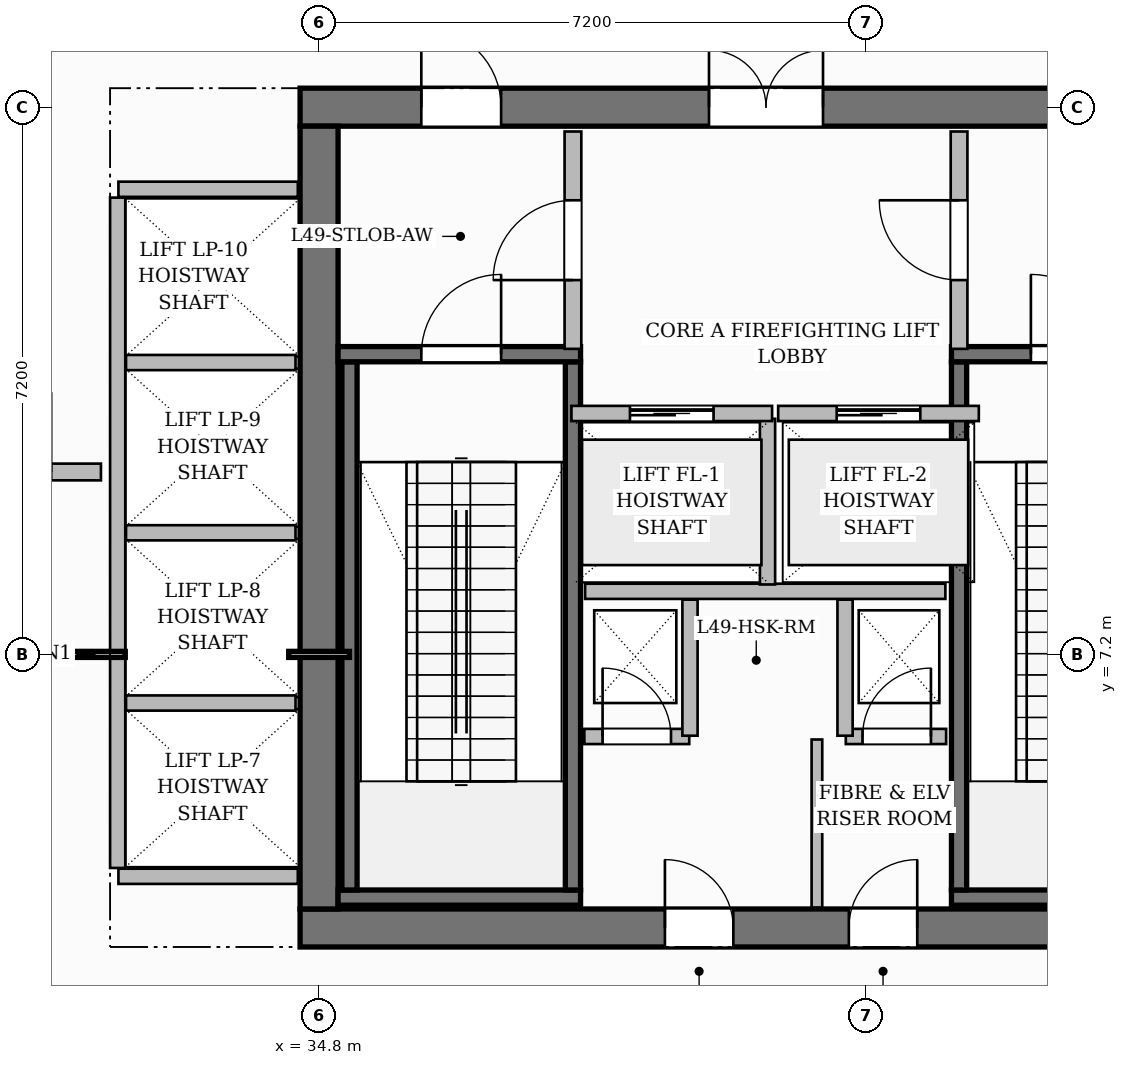
"""IFC4 building model, lengths in metres.
Left out: names, types, materials, properties, quantities, classifications, styles, units other than length and angle.
Written with IfcOpenShell. Run it as: python <this file> out.ifc"""

import sys

from ifc_helpers import new_model, si_unit, direction, frame, frame_2d, origin, place, context, subcontext, project, spatial, rectangle, extrude, source, transform, mapped, element, fill, save


model = new_model("IFC4")
c1 = context("Model", 3, precision=1e-05, world=origin(), true_north=direction((0.0, 1.0)))
c2 = subcontext(c1, "Body", "Model", "MODEL_VIEW")
j1 = project(units=[si_unit("LENGTHUNIT", "METRE"), si_unit("PLANEANGLEUNIT", "RADIAN")], contexts=[c1])
p1 = place(None, origin())
s1 = spatial("IfcSite", under=j1, at=p1, CompositionType="ELEMENT")
p2 = place(p1, origin())
s2 = spatial("IfcBuilding", under=s1, at=p2, CompositionType="ELEMENT")
p3 = place(p2, frame((0.0, 0.0, 196.5)))
s3 = spatial("IfcBuildingStorey", under=s2, at=p3, CompositionType="ELEMENT", Elevation=196.5)
p4 = place(p3, frame((34.55, 3.6, 0.0), z_axis=(0.0, 0.0, 1.0), x_axis=(1.0, 0.0, 0.0)))
e1 = element("IfcWall", 1, at=p4, inside=s3, PredefinedType="SHEAR", context=c2, shape_type="SweptSolid", body=[
    extrude(rectangle(XDim=15.5, YDim=0.5, at=frame_2d((7.75, 0.0))), origin(), (0.0, 0.0, 1.0), 5.4),
])
p5 = place(p4, frame((4.8, 0.0, 0.0)))
e2 = element("IfcOpeningElement", 2, at=p5, cuts=e1, PredefinedType="OPENING", context=c2, shape_type="SweptSolid", body=[
    extrude(rectangle(XDim=0.9, YDim=2.1, at=frame_2d((0.45, 1.05))), frame((0.0, 0.26, 0.0), z_axis=(0.0, -1.0, 0.0), x_axis=(1.0, 0.0, 0.0)), (0.0, 0.0, 1.0), 0.52),
])
p6 = place(p4, frame((7.22, 0.0, 0.0)))
e3 = element("IfcOpeningElement", 3, at=p6, cuts=e1, PredefinedType="OPENING", context=c2, shape_type="SweptSolid", body=[
    extrude(rectangle(XDim=0.9, YDim=2.1, at=frame_2d((0.45, 1.05))), frame((0.0, 0.26, 0.0), z_axis=(0.0, -1.0, 0.0), x_axis=(1.0, 0.0, 0.0)), (0.0, 0.0, 1.0), 0.52),
])
p7 = place(p3, frame((34.55, 14.4, 0.0), z_axis=(0.0, 0.0, 1.0), x_axis=(1.0, 0.0, 0.0)))
e4 = element("IfcWall", 4, at=p7, inside=s3, PredefinedType="SHEAR", context=c2, shape_type="SweptSolid", body=[
    extrude(rectangle(XDim=15.5, YDim=0.5, at=frame_2d((7.75, 0.0))), origin(), (0.0, 0.0, 1.0), 5.4),
])
p8 = place(p7, frame((5.38, 0.0, 0.0)))
e5 = element("IfcOpeningElement", 5, at=p8, cuts=e4, PredefinedType="OPENING", context=c2, shape_type="SweptSolid", body=[
    extrude(rectangle(XDim=1.5, YDim=2.2, at=frame_2d((0.75, 1.1))), frame((0.0, 0.26, 0.0), z_axis=(0.0, -1.0, 0.0), x_axis=(1.0, 0.0, 0.0)), (0.0, 0.0, 1.0), 0.52),
])
p9 = place(p7, frame((1.595, 0.0, 0.0)))
e6 = element("IfcOpeningElement", 6, at=p9, cuts=e4, PredefinedType="OPENING", context=c2, shape_type="SweptSolid", body=[
    extrude(rectangle(XDim=1.05, YDim=2.15, at=frame_2d((0.525, 1.075))), frame((0.0, 0.26, 0.0), z_axis=(0.0, -1.0, 0.0), x_axis=(1.0, 0.0, 0.0)), (0.0, 0.0, 1.0), 0.52),
])
p10 = place(p7, frame((11.225, 0.0, 0.0)))
e7 = element("IfcOpeningElement", 7, at=p10, cuts=e4, PredefinedType="OPENING", context=c2, shape_type="SweptSolid", body=[
    extrude(rectangle(XDim=1.05, YDim=2.15, at=frame_2d((0.525, 1.075))), frame((0.0, 0.26, 0.0), z_axis=(0.0, -1.0, 0.0), x_axis=(1.0, 0.0, 0.0)), (0.0, 0.0, 1.0), 0.52),
])
p11 = place(p3, frame((34.8, 3.85, 0.0), z_axis=(0.0, 0.0, 1.0), x_axis=(0.0, 1.0, 0.0)))
e8 = element("IfcWall", 8, at=p11, inside=s3, PredefinedType="SHEAR", context=c2, shape_type="SweptSolid", body=[
    extrude(rectangle(XDim=10.3, YDim=0.5, at=frame_2d((5.15, 0.0))), origin(), (0.0, 0.0, 1.0), 5.4),
])
p12 = place(p3, frame((35.05, 4.0, 0.0), z_axis=(0.0, 0.0, 1.0), x_axis=(1.0, 0.0, 0.0)))
e9 = element("IfcWall", 9, at=p12, inside=s3, PredefinedType="SHEAR", context=c2, shape_type="SweptSolid", body=[
    extrude(rectangle(XDim=3.19, YDim=0.2, at=frame_2d((1.595, 0.0))), origin(), (0.0, 0.0, 1.0), 5.4),
])
for number, where, z_axis, x_axis in (
    (10, (35.2, 4.1, 0.0), (0.0, 0.0, 1.0), (0.0, 1.0, 0.0)),
    (11, (38.14, 4.1, 0.0), (0.0, 0.0, 1.0), (0.0, 1.0, 0.0)),
):
    element("IfcWall", number, at=place(p3, frame(where, z_axis=z_axis, x_axis=x_axis)), inside=s3, PredefinedType="SHEAR", context=c2, shape_type="SweptSolid", body=[
        extrude(rectangle(XDim=6.95, YDim=0.2, at=frame_2d((3.475, 0.0))), origin(), (0.0, 0.0, 1.0), 5.4),
    ])
p13 = place(p3, frame((35.05, 11.15, 0.0), z_axis=(0.0, 0.0, 1.0), x_axis=(1.0, 0.0, 0.0)))
e12 = element("IfcWall", 12, at=p13, inside=s3, PredefinedType="SHEAR", context=c2, shape_type="SweptSolid", body=[
    extrude(rectangle(XDim=3.19, YDim=0.2, at=frame_2d((1.595, 0.0))), origin(), (0.0, 0.0, 1.0), 5.4),
])
p14 = place(p13, frame((1.095, 0.0, 0.0)))
e13 = element("IfcOpeningElement", 13, at=p14, cuts=e12, PredefinedType="OPENING", context=c2, shape_type="SweptSolid", body=[
    extrude(rectangle(XDim=1.05, YDim=2.2, at=frame_2d((0.525, 1.1))), frame((0.0, 0.11, 0.0), z_axis=(0.0, -1.0, 0.0), x_axis=(1.0, 0.0, 0.0)), (0.0, 0.0, 1.0), 0.22),
])
p15 = place(p3, frame((43.12, 4.0, 0.0), z_axis=(0.0, 0.0, 1.0), x_axis=(1.0, 0.0, 0.0)))
e14 = element("IfcWall", 14, at=p15, inside=s3, PredefinedType="SHEAR", context=c2, shape_type="SweptSolid", body=[
    extrude(rectangle(XDim=6.43, YDim=0.2, at=frame_2d((3.215, 0.0))), origin(), (0.0, 0.0, 1.0), 5.4),
])
p16 = place(p3, frame((43.22, 4.1, 0.0), z_axis=(0.0, 0.0, 1.0), x_axis=(0.0, 1.0, 0.0)))
e15 = element("IfcWall", 15, at=p16, inside=s3, PredefinedType="SHEAR", context=c2, shape_type="SweptSolid", body=[
    extrude(rectangle(XDim=6.95, YDim=0.2, at=frame_2d((3.475, 0.0))), origin(), (0.0, 0.0, 1.0), 5.4),
])
p17 = place(p3, frame((43.12, 11.15, 0.0), z_axis=(0.0, 0.0, 1.0), x_axis=(1.0, 0.0, 0.0)))
e16 = element("IfcWall", 16, at=p17, inside=s3, PredefinedType="SHEAR", context=c2, shape_type="SweptSolid", body=[
    extrude(rectangle(XDim=6.43, YDim=0.2, at=frame_2d((3.215, 0.0))), origin(), (0.0, 0.0, 1.0), 5.4),
])
p18 = place(p17, frame((1.045, 0.0, 0.0)))
e17 = element("IfcOpeningElement", 17, at=p18, cuts=e16, PredefinedType="OPENING", context=c2, shape_type="SweptSolid", body=[
    extrude(rectangle(XDim=1.05, YDim=2.2, at=frame_2d((0.525, 1.1))), frame((0.0, 0.11, 0.0), z_axis=(0.0, -1.0, 0.0), x_axis=(1.0, 0.0, 0.0)), (0.0, 0.0, 1.0), 0.22),
])
p19 = place(p17, frame((4.125, 0.0, 0.0)))
e18 = element("IfcOpeningElement", 18, at=p19, cuts=e16, PredefinedType="OPENING", context=c2, shape_type="SweptSolid", body=[
    extrude(rectangle(XDim=1.05, YDim=2.2, at=frame_2d((0.525, 1.1))), frame((0.0, 0.11, 0.0), z_axis=(0.0, -1.0, 0.0), x_axis=(1.0, 0.0, 0.0)), (0.0, 0.0, 1.0), 0.22),
])
p20 = place(p3, frame((38.3, 8.03, 0.0), z_axis=(0.0, 0.0, 1.0), x_axis=(1.0, 0.0, 0.0)))
e19 = element("IfcWall", 19, at=p20, inside=s3, PredefinedType="PARTITIONING", context=c2, shape_type="SweptSolid", body=[
    extrude(rectangle(XDim=4.74, YDim=0.2, at=frame_2d((2.37, 0.0))), origin(), (0.0, 0.0, 1.0), 5.15),
])
p21 = place(p3, frame((40.7, 8.12, 0.0), z_axis=(0.0, 0.0, 1.0), x_axis=(0.0, 1.0, 0.0)))
e20 = element("IfcWall", 20, at=p21, inside=s3, PredefinedType="PARTITIONING", context=c2, shape_type="SweptSolid", body=[
    extrude(rectangle(XDim=2.18, YDim=0.2, at=frame_2d((1.09, 0.0))), origin(), (0.0, 0.0, 1.0), 5.15),
])
p22 = place(p3, frame((38.14, 11.22, 0.0), z_axis=(0.0, 0.0, 1.0), x_axis=(0.0, 1.0, 0.0)))
e21 = element("IfcWall", 21, at=p22, inside=s3, PredefinedType="PARTITIONING", context=c2, shape_type="SweptSolid", body=[
    extrude(rectangle(XDim=2.86, YDim=0.22, at=frame_2d((1.43, 0.0))), origin(), (0.0, 0.0, 1.0), 5.15),
])
p23 = place(p22, frame((0.905, 0.0, 0.0)))
e22 = element("IfcOpeningElement", 22, at=p23, cuts=e21, PredefinedType="OPENING", context=c2, shape_type="SweptSolid", body=[
    extrude(rectangle(XDim=1.05, YDim=2.15, at=frame_2d((0.525, 1.075))), frame((0.0, 0.12, 0.0), z_axis=(0.0, -1.0, 0.0), x_axis=(1.0, 0.0, 0.0)), (0.0, 0.0, 1.0), 0.24),
])
p24 = place(p3, frame((43.22, 11.22, 0.0), z_axis=(0.0, 0.0, 1.0), x_axis=(0.0, 1.0, 0.0)))
e23 = element("IfcWall", 23, at=p24, inside=s3, PredefinedType="PARTITIONING", context=c2, shape_type="SweptSolid", body=[
    extrude(rectangle(XDim=2.86, YDim=0.22, at=frame_2d((1.43, 0.0))), origin(), (0.0, 0.0, 1.0), 5.15),
])
p25 = place(p24, frame((0.905, 0.0, 0.0)))
e24 = element("IfcOpeningElement", 24, at=p25, cuts=e23, PredefinedType="OPENING", context=c2, shape_type="SweptSolid", body=[
    extrude(rectangle(XDim=1.05, YDim=2.15, at=frame_2d((0.525, 1.075))), frame((0.0, 0.12, 0.0), z_axis=(0.0, -1.0, 0.0), x_axis=(1.0, 0.0, 0.0)), (0.0, 0.0, 1.0), 0.24),
])
p26 = place(p3, frame((38.29, 6.12, 0.0), z_axis=(0.0, 0.0, 1.0), x_axis=(1.0, 0.0, 0.0)))
e25 = element("IfcWall", 25, at=p26, inside=s3, PredefinedType="PARTITIONING", context=c2, shape_type="SweptSolid", body=[
    extrude(rectangle(XDim=1.38, YDim=0.2, at=frame_2d((0.69, 0.0))), origin(), (0.0, 0.0, 1.0), 5.15),
])
p27 = place(p26, frame((0.24, 0.0, 0.0)))
e26 = element("IfcOpeningElement", 26, at=p27, cuts=e25, PredefinedType="OPENING", context=c2, shape_type="SweptSolid", body=[
    extrude(rectangle(XDim=0.9, YDim=2.1, at=frame_2d((0.45, 1.05))), frame((0.0, 0.11, 0.0), z_axis=(0.0, -1.0, 0.0), x_axis=(1.0, 0.0, 0.0)), (0.0, 0.0, 1.0), 0.22),
])
p28 = place(p3, frame((39.68, 6.13, 0.0), z_axis=(0.0, 0.0, 1.0), x_axis=(0.0, 1.0, 0.0)))
e27 = element("IfcWall", 27, at=p28, inside=s3, PredefinedType="PARTITIONING", context=c2, shape_type="SweptSolid", body=[
    extrude(rectangle(XDim=1.79, YDim=0.2, at=frame_2d((0.895, 0.0))), origin(), (0.0, 0.0, 1.0), 5.15),
])
p29 = place(p3, frame((41.73, 6.12, 0.0), z_axis=(0.0, 0.0, 1.0), x_axis=(1.0, 0.0, 0.0)))
e28 = element("IfcWall", 28, at=p29, inside=s3, PredefinedType="PARTITIONING", context=c2, shape_type="SweptSolid", body=[
    extrude(rectangle(XDim=1.32, YDim=0.2, at=frame_2d((0.66, 0.0))), origin(), (0.0, 0.0, 1.0), 5.15),
])
p30 = place(p29, frame((0.22, 0.0, 0.0)))
e29 = element("IfcOpeningElement", 29, at=p30, cuts=e28, PredefinedType="OPENING", context=c2, shape_type="SweptSolid", body=[
    extrude(rectangle(XDim=0.9, YDim=2.1, at=frame_2d((0.45, 1.05))), frame((0.0, 0.11, 0.0), z_axis=(0.0, -1.0, 0.0), x_axis=(1.0, 0.0, 0.0)), (0.0, 0.0, 1.0), 0.22),
])
p31 = place(p3, frame((41.72, 6.13, 0.0), z_axis=(0.0, 0.0, 1.0), x_axis=(0.0, 1.0, 0.0)))
e30 = element("IfcWall", 30, at=p31, inside=s3, PredefinedType="PARTITIONING", context=c2, shape_type="SweptSolid", body=[
    extrude(rectangle(XDim=1.79, YDim=0.2, at=frame_2d((0.895, 0.0))), origin(), (0.0, 0.0, 1.0), 5.15),
])
p32 = place(p3, frame((41.35, 3.87, 0.0), z_axis=(0.0, 0.0, 1.0), x_axis=(0.0, 1.0, 0.0)))
e31 = element("IfcWall", 31, at=p32, inside=s3, PredefinedType="PARTITIONING", context=c2, shape_type="SweptSolid", body=[
    extrude(rectangle(XDim=2.21, YDim=0.14, at=frame_2d((1.105, 0.0))), origin(), (0.0, 0.0, 1.0), 5.15),
])
for number, where, z_axis, x_axis in (
    (32, (32.16, 4.28, 0.0), (0.0, 0.0, 1.0), (1.0, 0.0, 0.0)),
    (33, (32.16, 13.32, 0.0), (0.0, 0.0, 1.0), (1.0, 0.0, 0.0)),
):
    element("IfcWall", number, at=place(p3, frame(where, z_axis=z_axis, x_axis=x_axis)), inside=s3, PredefinedType="PARTITIONING", context=c2, shape_type="SweptSolid", body=[
        extrude(rectangle(XDim=2.36, YDim=0.2, at=frame_2d((1.18, 0.0))), origin(), (0.0, 0.0, 1.0), 5.15),
    ])
p33 = place(p3, frame((32.15, 4.39, 0.0), z_axis=(0.0, 0.0, 1.0), x_axis=(0.0, 1.0, 0.0)))
e34 = element("IfcWall", 34, at=p33, inside=s3, PredefinedType="PARTITIONING", context=c2, shape_type="SweptSolid", body=[
    extrude(rectangle(XDim=8.82, YDim=0.2, at=frame_2d((4.41, 0.0))), origin(), (0.0, 0.0, 1.0), 5.15),
])
for number, where, z_axis, x_axis in (
    (35, (32.26, 6.56, 0.0), (0.0, 0.0, 1.0), (1.0, 0.0, 0.0)),
    (36, (32.26, 8.8, 0.0), (0.0, 0.0, 1.0), (1.0, 0.0, 0.0)),
    (37, (32.26, 11.04, 0.0), (0.0, 0.0, 1.0), (1.0, 0.0, 0.0)),
):
    element("IfcWall", number, at=place(p3, frame(where, z_axis=z_axis, x_axis=x_axis)), inside=s3, PredefinedType="PARTITIONING", context=c2, shape_type="SweptSolid", body=[
        extrude(rectangle(XDim=2.23, YDim=0.2, at=frame_2d((1.115, 0.0))), origin(), (0.0, 0.0, 1.0), 5.15),
    ])
p34 = place(p3, frame((14.558, 9.6, 0.0), z_axis=(0.0, 0.0, 1.0), x_axis=(1.0, 0.0, 0.0)))
e38 = element("IfcWall", 38, at=p34, inside=s3, PredefinedType="PARTITIONING", context=c2, shape_type="SweptSolid", body=[
    extrude(rectangle(XDim=17.372, YDim=0.22, at=frame_2d((8.686, 0.0))), origin(), (0.0, 0.0, 1.0), 5.15),
])
p35 = place(p34, frame((15.667, 0.0, 0.0)))
e39 = element("IfcOpeningElement", 39, at=p35, cuts=e38, PredefinedType="OPENING", context=c2, shape_type="SweptSolid", body=[
    extrude(rectangle(XDim=1.05, YDim=2.15, at=frame_2d((0.525, 1.075))), frame((0.0, 0.12, 0.0), z_axis=(0.0, -1.0, 0.0), x_axis=(1.0, 0.0, 0.0)), (0.0, 0.0, 1.0), 0.24),
])
p36 = place(p34, frame((8.192, 0.0, 0.0)))
e40 = element("IfcOpeningElement", 40, at=p36, cuts=e38, PredefinedType="OPENING", context=c2, shape_type="SweptSolid", body=[
    extrude(rectangle(XDim=1.5, YDim=2.2, at=frame_2d((0.75, 1.1))), frame((0.0, 0.12, 0.0), z_axis=(0.0, -1.0, 0.0), x_axis=(1.0, 0.0, 0.0)), (0.0, 0.0, 1.0), 0.24),
])
p37 = place(p3, frame((38.12, 10.37, 0.0), z_axis=(0.0, 0.0, 1.0), x_axis=(1.0, 0.0, 0.0)))
e41 = element("IfcWall", 41, at=p37, inside=s3, PredefinedType="PARTITIONING", context=c2, shape_type="SweptSolid", body=[
    extrude(rectangle(XDim=2.64, YDim=0.2, at=frame_2d((1.32, 0.0))), origin(), (0.0, 0.0, 1.0), 5.15),
])
p38 = place(p37, frame((0.77, 0.0, 0.0)))
e42 = element("IfcOpeningElement", 42, at=p38, cuts=e41, PredefinedType="OPENING", context=c2, shape_type="SweptSolid", body=[
    extrude(rectangle(XDim=1.1, YDim=2.2, at=frame_2d((0.55, 1.1))), frame((0.0, 0.11, 0.0), z_axis=(0.0, -1.0, 0.0), x_axis=(1.0, 0.0, 0.0)), (0.0, 0.0, 1.0), 0.22),
])
p39 = place(p3, frame((40.84, 10.37, 0.0), z_axis=(0.0, 0.0, 1.0), x_axis=(1.0, 0.0, 0.0)))
e43 = element("IfcWall", 43, at=p39, inside=s3, PredefinedType="PARTITIONING", context=c2, shape_type="SweptSolid", body=[
    extrude(rectangle(XDim=2.64, YDim=0.2, at=frame_2d((1.32, 0.0))), origin(), (0.0, 0.0, 1.0), 5.15),
])
p40 = place(p39, frame((0.77, 0.0, 0.0)))
e44 = element("IfcOpeningElement", 44, at=p40, cuts=e43, PredefinedType="OPENING", context=c2, shape_type="SweptSolid", body=[
    extrude(rectangle(XDim=1.1, YDim=2.2, at=frame_2d((0.55, 1.1))), frame((0.0, 0.11, 0.0), z_axis=(0.0, -1.0, 0.0), x_axis=(1.0, 0.0, 0.0)), (0.0, 0.0, 1.0), 0.22),
])
m1 = source(origin(), c2, "Body", "SweptSolid", [
    extrude(rectangle(XDim=1.05, YDim=2.2, at=frame_2d((0.525, 1.1))), frame((0.0, 0.025, 0.0), z_axis=(0.0, -1.0, 0.0), x_axis=(1.0, 0.0, 0.0)), (0.0, 0.0, 1.0), 0.05),
])
p41 = place(p14, origin())
e45 = element("IfcDoor", 45, at=p41, inside=s3, OperationType="SINGLE_SWING_RIGHT", PredefinedType="DOOR", context=c2, shape_type="MappedRepresentation", body=[
    mapped(m1, transform((0.0, 0.0, 0.0), scale=1.0)),
])
fill(e13, e45)
p42 = place(p18, origin())
e46 = element("IfcDoor", 46, at=p42, inside=s3, OperationType="SINGLE_SWING_LEFT", PredefinedType="DOOR", context=c2, shape_type="MappedRepresentation", body=[
    mapped(m1, transform((0.0, 0.0, 0.0), scale=1.0)),
])
fill(e17, e46)
m2 = source(origin(), c2, "Body", "SweptSolid", [
    extrude(rectangle(XDim=1.05, YDim=2.15, at=frame_2d((0.525, 1.075))), frame((0.0, 0.025, 0.0), z_axis=(0.0, -1.0, 0.0), x_axis=(1.0, 0.0, 0.0)), (0.0, 0.0, 1.0), 0.05),
])
p43 = place(p23, origin())
e47 = element("IfcDoor", 47, at=p43, inside=s3, OperationType="SINGLE_SWING_LEFT", PredefinedType="DOOR", context=c2, shape_type="MappedRepresentation", body=[
    mapped(m2, transform((0.0, 0.0, 0.0), scale=1.0)),
])
fill(e22, e47)
p44 = place(p25, origin())
e48 = element("IfcDoor", 48, at=p44, inside=s3, OperationType="SINGLE_SWING_RIGHT", PredefinedType="DOOR", context=c2, shape_type="MappedRepresentation", body=[
    mapped(m2, transform((0.0, 0.0, 0.0), scale=1.0)),
])
fill(e24, e48)
m3 = source(origin(), c2, "Body", "SweptSolid", [
    extrude(rectangle(XDim=1.5, YDim=2.2, at=frame_2d((0.75, 1.1))), frame((0.0, 0.025, 0.0), z_axis=(0.0, -1.0, 0.0), x_axis=(1.0, 0.0, 0.0)), (0.0, 0.0, 1.0), 0.05),
])
p45 = place(p8, origin())
e49 = element("IfcDoor", 49, at=p45, inside=s3, OperationType="DOUBLE_DOOR_SINGLE_SWING", PredefinedType="DOOR", context=c2, shape_type="MappedRepresentation", body=[
    mapped(m3, transform((0.0, 0.0, 0.0), scale=1.0)),
])
fill(e5, e49)
p46 = place(p9, origin())
e50 = element("IfcDoor", 50, at=p46, inside=s3, OperationType="SINGLE_SWING_LEFT", PredefinedType="DOOR", context=c2, shape_type="MappedRepresentation", body=[
    mapped(m2, transform((0.0, 0.0, 0.0), scale=1.0)),
])
fill(e6, e50)
m4 = source(origin(), c2, "Body", "SweptSolid", [
    extrude(rectangle(XDim=0.9, YDim=2.1, at=frame_2d((0.45, 1.05))), frame((0.0, 0.025, 0.0), z_axis=(0.0, -1.0, 0.0), x_axis=(1.0, 0.0, 0.0)), (0.0, 0.0, 1.0), 0.05),
])
p47 = place(p27, origin())
e51 = element("IfcDoor", 51, at=p47, inside=s3, OperationType="SINGLE_SWING_LEFT", PredefinedType="DOOR", context=c2, shape_type="MappedRepresentation", body=[
    mapped(m4, transform((0.0, 0.0, 0.0), scale=1.0)),
])
fill(e26, e51)
p48 = place(p30, origin())
e52 = element("IfcDoor", 52, at=p48, inside=s3, OperationType="SINGLE_SWING_RIGHT", PredefinedType="DOOR", context=c2, shape_type="MappedRepresentation", body=[
    mapped(m4, transform((0.0, 0.0, 0.0), scale=1.0)),
])
fill(e29, e52)
p49 = place(p5, origin())
e53 = element("IfcDoor", 53, at=p49, inside=s3, OperationType="SINGLE_SWING_LEFT", PredefinedType="DOOR", context=c2, shape_type="MappedRepresentation", body=[
    mapped(m4, transform((0.0, 0.0, 0.0), scale=1.0)),
])
fill(e2, e53)
p50 = place(p6, origin())
e54 = element("IfcDoor", 54, at=p50, inside=s3, OperationType="SINGLE_SWING_RIGHT", PredefinedType="DOOR", context=c2, shape_type="MappedRepresentation", body=[
    mapped(m4, transform((0.0, 0.0, 0.0), scale=1.0)),
])
fill(e3, e54)
m5 = source(origin(), c2, "Body", "SweptSolid", [
    extrude(rectangle(XDim=1.1, YDim=2.2, at=frame_2d((0.55, 1.1))), frame((0.0, 0.025, 0.0), z_axis=(0.0, -1.0, 0.0), x_axis=(1.0, 0.0, 0.0)), (0.0, 0.0, 1.0), 0.05),
])
p51 = place(p38, origin())
e55 = element("IfcDoor", 55, at=p51, inside=s3, OperationType="SLIDING_TO_LEFT", PredefinedType="DOOR", context=c2, shape_type="MappedRepresentation", body=[
    mapped(m5, transform((0.0, 0.0, 0.0), scale=1.0)),
])
fill(e42, e55)
p52 = place(p40, origin())
e56 = element("IfcDoor", 56, at=p52, inside=s3, OperationType="SLIDING_TO_LEFT", PredefinedType="DOOR", context=c2, shape_type="MappedRepresentation", body=[
    mapped(m5, transform((0.0, 0.0, 0.0), scale=1.0)),
])
fill(e44, e56)
save(model, sys.argv[1])
